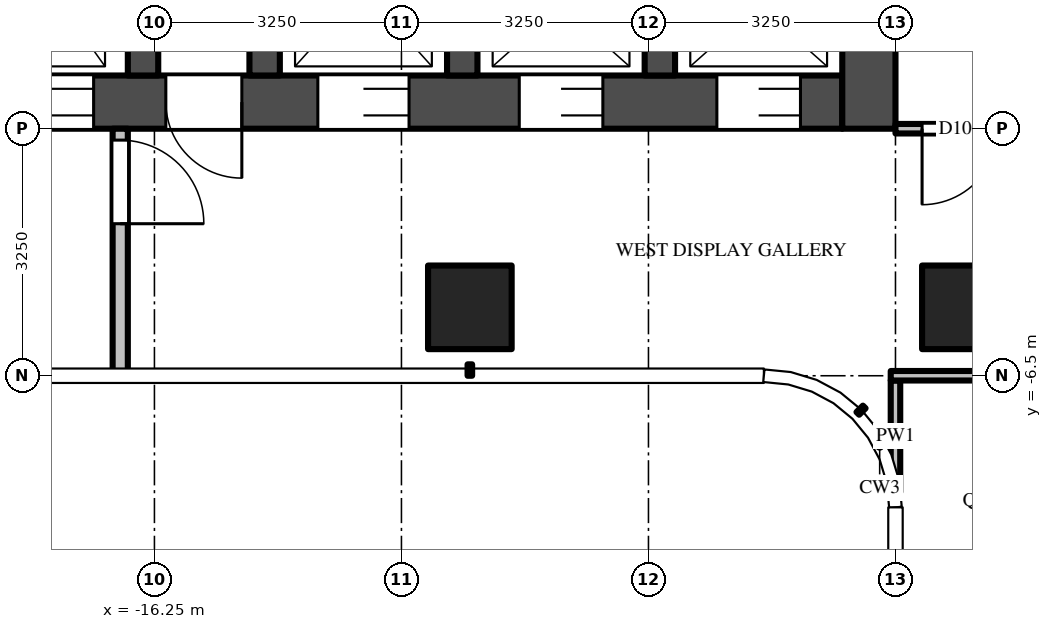
"""IFC4 building model, lengths in metres.
Left out: names, types, materials, properties, quantities, classifications, styles, units other than length and angle.
Written with IfcOpenShell. Run it as: python <this file> out.ifc"""

import sys

from ifc_helpers import new_model, si_unit, direction, frame, frame_2d, origin, origin_2d, place, context, subcontext, project, spatial, rectangle, extrude, source, transform, mapped, element, fill, save


model = new_model("IFC4")
c1 = context("Model", 3, precision=1e-05, world=origin(), true_north=direction((0.0, 1.0)))
c2 = subcontext(c1, "Body", "Model", "MODEL_VIEW")
j1 = project(units=[si_unit("LENGTHUNIT", "METRE"), si_unit("PLANEANGLEUNIT", "RADIAN")], contexts=[c1])
p1 = place(None, origin())
s1 = spatial("IfcSite", under=j1, at=p1, CompositionType="ELEMENT")
p2 = place(p1, origin())
s2 = spatial("IfcBuilding", under=s1, at=p2, CompositionType="ELEMENT")
p3 = place(p2, frame((0.0, 0.0, 255.8)))
s3 = spatial("IfcBuildingStorey", under=s2, at=p3, CompositionType="ELEMENT", Elevation=255.8)
m1 = source(origin(), c2, "Body", "SweptSolid", [
    extrude(rectangle(XDim=1.1, YDim=1.1, at=origin_2d()), origin(), (0.0, 0.0, 1.0), 3.9),
])
for number, where, z_axis, x_axis in (
    (1, (-5.6, -5.6, 0.0), (0.0, 0.0, 1.0), (1.0, 0.0, 0.0)),
    (2, (-12.1, -5.6, 0.0), (0.0, 0.0, 1.0), (1.0, 0.0, 0.0)),
):
    element("IfcColumn", number, at=place(p3, frame(where, z_axis=z_axis, x_axis=x_axis)), inside=s3, PredefinedType="COLUMN", context=c2, shape_type="MappedRepresentation", body=[
        mapped(m1, transform((0.0, 0.0, 0.0))),
    ])
m2 = source(origin(), c2, "Body", "SweptSolid", [
    extrude(rectangle(XDim=14.85, YDim=0.7, at=frame_2d((7.425, 0.0))), origin(), (0.0, 0.0, 1.0), 3.7),
])
p4 = place(p3, frame((-7.2, -2.9, 0.0), z_axis=(0.0, 0.0, 1.0), x_axis=(-1.0, 0.0, 0.0)))
e3 = element("IfcWall", 3, at=p4, inside=s3, PredefinedType="SHEAR", context=c2, shape_type="MappedRepresentation", body=[
    mapped(m2, transform((0.0, 0.0, 0.0))),
])
m3 = source(origin(), c2, "Body", "SweptSolid", [
    extrude(rectangle(XDim=1.1, YDim=2.1, at=frame_2d((0.55, 1.05))), frame((0.0, 0.36, 0.0), z_axis=(0.0, -1.0, 0.0), x_axis=(1.0, 0.0, 0.0)), (0.0, 0.0, 1.0), 0.72),
])
p5 = place(p4, frame((0.55, 0.0, 0.0)))
e4 = element("IfcOpeningElement", 4, at=p5, cuts=e3, PredefinedType="OPENING", context=c2, shape_type="MappedRepresentation", body=[
    mapped(m3, transform((0.0, 0.0, 0.0))),
])
p6 = place(p4, frame((3.15, 0.0, 0.0)))
e5 = element("IfcOpeningElement", 5, at=p6, cuts=e3, PredefinedType="OPENING", context=c2, shape_type="MappedRepresentation", body=[
    mapped(m3, transform((0.0, 0.0, 0.0))),
])
m4 = source(origin(), c2, "Body", "SweptSolid", [
    extrude(rectangle(XDim=1.2, YDim=2.1, at=frame_2d((0.6, 1.05))), frame((0.0, 0.36, 0.0), z_axis=(0.0, -1.0, 0.0), x_axis=(1.0, 0.0, 0.0)), (0.0, 0.0, 1.0), 0.72),
])
p7 = place(p4, frame((5.7, 0.0, 0.0)))
e6 = element("IfcOpeningElement", 6, at=p7, cuts=e3, PredefinedType="OPENING", context=c2, shape_type="MappedRepresentation", body=[
    mapped(m4, transform((0.0, 0.0, 0.0))),
])
m5 = source(origin(), c2, "Body", "SweptSolid", [
    extrude(rectangle(XDim=1.3, YDim=2.1, at=frame_2d((0.65, 1.05))), frame((0.0, 0.36, 0.0), z_axis=(0.0, -1.0, 0.0), x_axis=(1.0, 0.0, 0.0)), (0.0, 0.0, 1.0), 0.72),
])
p8 = place(p4, frame((12.2, 0.0, 0.0)))
e7 = element("IfcOpeningElement", 7, at=p8, cuts=e3, PredefinedType="OPENING", context=c2, shape_type="MappedRepresentation", body=[
    mapped(m5, transform((0.0, 0.0, 0.0))),
])
p9 = place(p4, frame((9.85, 0.0, 0.0)))
e8 = element("IfcOpeningElement", 8, at=p9, cuts=e3, PredefinedType="OPENING", context=c2, shape_type="MappedRepresentation", body=[
    mapped(m4, transform((0.0, 0.0, 0.0))),
])
m6 = source(origin(), c2, "Body", "SweptSolid", [
    extrude(rectangle(XDim=1.0, YDim=2.1, at=frame_2d((0.5, 1.05))), frame((0.0, 0.36, 0.0), z_axis=(0.0, -1.0, 0.0), x_axis=(1.0, 0.0, 0.0)), (0.0, 0.0, 1.0), 0.72),
])
p10 = place(p4, frame((7.9, 0.0, 0.0)))
e9 = element("IfcOpeningElement", 9, at=p10, cuts=e3, PredefinedType="OPENING", context=c2, shape_type="MappedRepresentation", body=[
    mapped(m6, transform((0.0, 0.0, 0.0))),
])
m7 = source(origin(), c2, "Body", "SweptSolid", [
    extrude(rectangle(XDim=9.05, YDim=0.7, at=frame_2d((4.525, 0.0))), origin(), (0.0, 0.0, 1.0), 3.7),
])
p11 = place(p3, frame((-6.85, 5.8, 0.0), z_axis=(0.0, 0.0, 1.0), x_axis=(0.0, -1.0, 0.0)))
e10 = element("IfcWall", 10, at=p11, inside=s3, PredefinedType="SHEAR", context=c2, shape_type="MappedRepresentation", body=[
    mapped(m7, transform((0.0, 0.0, 0.0))),
])
m8 = source(origin(), c2, "Body", "SweptSolid", [
    extrude(rectangle(XDim=1.8, YDim=2.1, at=frame_2d((0.9, 1.05))), frame((0.0, 0.36, 0.0), z_axis=(0.0, -1.0, 0.0), x_axis=(1.0, 0.0, 0.0)), (0.0, 0.0, 1.0), 0.72),
])
p12 = place(p11, frame((3.15, 0.0, 0.0)))
e11 = element("IfcOpeningElement", 11, at=p12, cuts=e10, PredefinedType="OPENING", context=c2, shape_type="MappedRepresentation", body=[
    mapped(m8, transform((0.0, 0.0, 0.0))),
])
m9 = source(origin(), c2, "Body", "SweptSolid", [
    extrude(rectangle(XDim=2.45, YDim=0.4, at=frame_2d((1.225, 0.0))), origin(), (0.0, 0.0, 1.0), 3.7),
])
for number, where, z_axis, x_axis in (
    (12, (-9.6, -0.1, 0.0), (0.0, 0.0, 1.0), (0.0, -1.0, 0.0)),
    (13, (-12.2, -0.1, 0.0), (0.0, 0.0, 1.0), (0.0, -1.0, 0.0)),
    (14, (-14.8, -0.1, 0.0), (0.0, 0.0, 1.0), (0.0, -1.0, 0.0)),
    (15, (-16.4, -0.1, 0.0), (0.0, 0.0, 1.0), (0.0, -1.0, 0.0)),
):
    element("IfcWall", number, at=place(p3, frame(where, z_axis=z_axis, x_axis=x_axis)), inside=s3, PredefinedType="SHEAR", context=c2, shape_type="MappedRepresentation", body=[
        mapped(m9, transform((0.0, 0.0, 0.0))),
    ])
m10 = source(origin(), c2, "Body", "SweptSolid", [
    extrude(rectangle(XDim=3.25, YDim=0.2, at=frame_2d((1.625, 0.0))), origin(), (0.0, 0.0, 1.0), 3.7),
])
p13 = place(p3, frame((-16.7, -3.25, 0.0), z_axis=(0.0, 0.0, 1.0), x_axis=(0.0, -1.0, 0.0)))
e16 = element("IfcWall", 16, at=p13, inside=s3, PredefinedType="PARTITIONING", context=c2, shape_type="MappedRepresentation", body=[
    mapped(m10, transform((0.0, 0.0, 0.0))),
])
m11 = source(origin(), c2, "Body", "SweptSolid", [
    extrude(rectangle(XDim=1.1, YDim=2.1, at=frame_2d((0.55, 1.05))), frame((0.0, 0.11, 0.0), z_axis=(0.0, -1.0, 0.0), x_axis=(1.0, 0.0, 0.0)), (0.0, 0.0, 1.0), 0.22),
])
p14 = place(p13, frame((0.15, 0.0, 0.0)))
e17 = element("IfcOpeningElement", 17, at=p14, cuts=e16, PredefinedType="OPENING", context=c2, shape_type="MappedRepresentation", body=[
    mapped(m11, transform((0.0, 0.0, 0.0))),
])
m12 = source(origin(), c2, "Body", "SweptSolid", [
    extrude(rectangle(XDim=1.469, YDim=0.125, at=frame_2d((0.734, 0.0))), origin(), (0.0, 0.0, 1.0), 3.7),
])
p15 = place(p3, frame((-6.5, -6.562, 0.0), z_axis=(0.0, 0.0, 1.0), x_axis=(0.0, -1.0, 0.0)))
e18 = element("IfcWall", 18, at=p15, inside=s3, PredefinedType="PARTITIONING", context=c2, shape_type="MappedRepresentation", body=[
    mapped(m12, transform((0.0, 0.0, 0.0))),
])
m13 = source(origin(), c2, "Body", "SweptSolid", [
    extrude(rectangle(XDim=3.725, YDim=0.125, at=frame_2d((1.863, 0.0))), origin(), (0.0, 0.0, 1.0), 2.78),
])
p16 = place(p3, frame((-2.837, -6.5, 0.0), z_axis=(0.0, 0.0, 1.0), x_axis=(-1.0, 0.0, 0.0)))
e19 = element("IfcWall", 19, at=p16, inside=s3, PredefinedType="PARTITIONING", context=c2, shape_type="MappedRepresentation", body=[
    mapped(m13, transform((0.0, 0.0, 0.0))),
])
m14 = source(origin(), c2, "Body", "SweptSolid", [
    extrude(rectangle(XDim=1.0, YDim=2.1, at=frame_2d((0.5, 1.05))), frame((0.0, 0.073, 0.0), z_axis=(0.0, -1.0, 0.0), x_axis=(1.0, 0.0, 0.0)), (0.0, 0.0, 1.0), 0.145),
])
p17 = place(p16, frame((1.113, 0.0, 0.0)))
e20 = element("IfcOpeningElement", 20, at=p17, cuts=e19, PredefinedType="OPENING", context=c2, shape_type="MappedRepresentation", body=[
    mapped(m14, transform((0.0, 0.0, 0.0))),
])
m15 = source(origin(), c2, "Body", "SweptSolid", [
    extrude(rectangle(XDim=5.363, YDim=0.125, at=frame_2d((2.681, 0.0))), origin(), (0.0, 0.0, 1.0), 2.997),
])
p18 = place(p3, frame((-1.137, -3.25, 0.0), z_axis=(0.0, 0.0, 1.0), x_axis=(-1.0, 0.0, 0.0)))
e21 = element("IfcWall", 21, at=p18, inside=s3, PredefinedType="PARTITIONING", context=c2, shape_type="MappedRepresentation", body=[
    mapped(m15, transform((0.0, 0.0, 0.0))),
])
p19 = place(p18, frame((4.012, 0.0, 0.0)))
e22 = element("IfcOpeningElement", 22, at=p19, cuts=e21, PredefinedType="OPENING", context=c2, shape_type="MappedRepresentation", body=[
    mapped(m14, transform((0.0, 0.0, 0.0))),
])
m16 = source(origin(), c2, "Body", "SweptSolid", [
    extrude(rectangle(XDim=1.1, YDim=2.1, at=frame_2d((0.55, 1.05))), frame((0.0, -0.275, 0.0), z_axis=(0.0, -1.0, 0.0), x_axis=(1.0, 0.0, 0.0)), (0.0, 0.0, 1.0), 0.05),
])
p20 = place(p5, origin())
e23 = element("IfcDoor", 23, at=p20, inside=s3, OperationType="DOUBLE_DOOR_SLIDING", PredefinedType="DOOR", context=c2, shape_type="MappedRepresentation", body=[
    mapped(m16, transform((0.0, 0.0, 0.0))),
])
fill(e4, e23)
p21 = place(p6, origin())
e24 = element("IfcDoor", 24, at=p21, inside=s3, OperationType="DOUBLE_DOOR_SLIDING", PredefinedType="DOOR", context=c2, shape_type="MappedRepresentation", body=[
    mapped(m16, transform((0.0, 0.0, 0.0))),
])
fill(e5, e24)
m17 = source(origin(), c2, "Body", "SweptSolid", [
    extrude(rectangle(XDim=1.2, YDim=2.1, at=frame_2d((0.6, 1.05))), frame((0.0, -0.275, 0.0), z_axis=(0.0, -1.0, 0.0), x_axis=(1.0, 0.0, 0.0)), (0.0, 0.0, 1.0), 0.05),
])
p22 = place(p7, origin())
e25 = element("IfcDoor", 25, at=p22, inside=s3, OperationType="DOUBLE_DOOR_SLIDING", PredefinedType="DOOR", context=c2, shape_type="MappedRepresentation", body=[
    mapped(m17, transform((0.0, 0.0, 0.0))),
])
fill(e6, e25)
p23 = place(p9, origin())
e26 = element("IfcDoor", 26, at=p23, inside=s3, OperationType="DOUBLE_DOOR_SLIDING", PredefinedType="DOOR", context=c2, shape_type="MappedRepresentation", body=[
    mapped(m17, transform((0.0, 0.0, 0.0))),
])
fill(e8, e26)
m18 = source(origin(), c2, "Body", "SweptSolid", [
    extrude(rectangle(XDim=1.0, YDim=2.1, at=frame_2d((0.5, 1.05))), frame((0.0, -0.275, 0.0), z_axis=(0.0, -1.0, 0.0), x_axis=(1.0, 0.0, 0.0)), (0.0, 0.0, 1.0), 0.05),
])
p24 = place(p10, origin())
e27 = element("IfcDoor", 27, at=p24, inside=s3, OperationType="SINGLE_SWING_LEFT", PredefinedType="DOOR", context=c2, shape_type="MappedRepresentation", body=[
    mapped(m18, transform((0.0, 0.0, 0.0))),
])
fill(e9, e27)
m19 = source(origin(), c2, "Body", "SweptSolid", [
    extrude(rectangle(XDim=1.1, YDim=2.1, at=frame_2d((0.55, 1.05))), frame((0.0, 0.025, 0.0), z_axis=(0.0, -1.0, 0.0), x_axis=(1.0, 0.0, 0.0)), (0.0, 0.0, 1.0), 0.05),
])
p25 = place(p14, origin())
e28 = element("IfcDoor", 28, at=p25, inside=s3, OperationType="SINGLE_SWING_RIGHT", PredefinedType="DOOR", context=c2, shape_type="MappedRepresentation", body=[
    mapped(m19, transform((0.0, 0.0, 0.0))),
])
fill(e17, e28)
m20 = source(origin(), c2, "Body", "SweptSolid", [
    extrude(rectangle(XDim=1.0, YDim=2.1, at=frame_2d((0.5, 1.05))), frame((0.0, 0.025, 0.0), z_axis=(0.0, -1.0, 0.0), x_axis=(1.0, 0.0, 0.0)), (0.0, 0.0, 1.0), 0.05),
])
p26 = place(p19, origin())
e29 = element("IfcDoor", 29, at=p26, inside=s3, OperationType="SINGLE_SWING_RIGHT", PredefinedType="DOOR", context=c2, shape_type="MappedRepresentation", body=[
    mapped(m20, transform((0.0, 0.0, 0.0))),
])
fill(e22, e29)
save(model, sys.argv[1])
